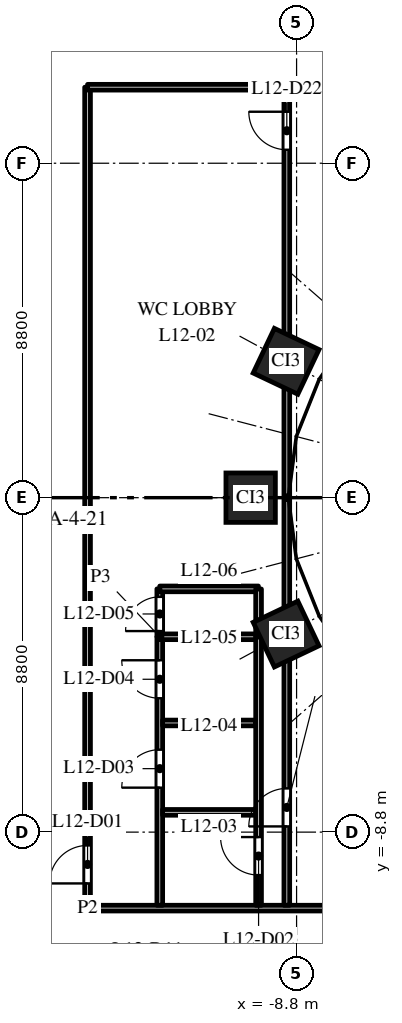
"""IFC4 building model, lengths in metres.
Left out: names, types, materials, properties, quantities, classifications, styles, units other than length and angle.
Written with IfcOpenShell. Run it as: python <this file> out.ifc"""

import sys

from ifc_helpers import new_model, si_unit, direction, frame, frame_2d, origin, origin_2d, place, context, subcontext, project, spatial, rectangle, extrude, element, fill, save


model = new_model("IFC4")
c1 = context("Model", 3, precision=1e-05, world=origin(), true_north=direction((0.0, 1.0)))
c2 = subcontext(c1, "Body", "Model", "MODEL_VIEW")
j1 = project(units=[si_unit("LENGTHUNIT", "METRE"), si_unit("PLANEANGLEUNIT", "RADIAN")], contexts=[c1])
p1 = place(None, origin())
s1 = spatial("IfcSite", under=j1, at=p1, CompositionType="ELEMENT")
p2 = place(p1, origin())
s2 = spatial("IfcBuilding", under=s1, at=p2, CompositionType="ELEMENT")
p3 = place(p2, frame((0.0, 0.0, 58.5)))
s3 = spatial("IfcBuildingStorey", under=s2, at=p3, CompositionType="ELEMENT", Elevation=58.5)
for number, where, z_axis, x_axis in (
    (1, (-9.076, 3.588, 0.0), (0.0, 0.0, 1.0), (-0.429, -0.903, 0.0)),
    (2, (-10.008, 0.0, 0.0), (0.0, 0.0, 1.0), (0.0, -1.0, 0.0)),
    (3, (-9.076, -3.588, 0.0), (0.0, 0.0, 1.0), (0.429, -0.903, 0.0)),
):
    element("IfcColumn", number, at=place(p3, frame(where, z_axis=z_axis, x_axis=x_axis)), inside=s3, PredefinedType="COLUMN", context=c2, shape_type="SweptSolid", body=[
        extrude(rectangle(XDim=1.3, YDim=1.3, at=origin_2d()), origin(), (0.0, 0.0, 1.0), 4.0),
    ])
p4 = place(p3, frame((-14.3, -10.8, 0.0), z_axis=(0.0, 0.0, 1.0), x_axis=(0.0, 1.0, 0.0)))
e4 = element("IfcWall", 4, at=p4, inside=s3, PredefinedType="PARTITIONING", context=c2, shape_type="SweptSolid", body=[
    extrude(rectangle(XDim=21.6, YDim=0.15, at=frame_2d((10.8, 0.0))), origin(), (0.0, 0.0, 1.0), 2.75),
])
p5 = place(p4, frame((0.65, 0.0, 0.0)))
e5 = element("IfcOpeningElement", 5, at=p5, cuts=e4, PredefinedType="OPENING", context=c2, shape_type="SweptSolid", body=[
    extrude(rectangle(XDim=1.0, YDim=2.1, at=frame_2d((0.5, 1.05))), frame((0.0, 0.085, 0.0), z_axis=(0.0, -1.0, 0.0), x_axis=(1.0, 0.0, 0.0)), (0.0, 0.0, 1.0), 0.17),
])
p6 = place(p3, frame((-14.3, -10.8, 0.0), z_axis=(0.0, 0.0, 1.0), x_axis=(1.0, 0.0, 0.0)))
e6 = element("IfcWall", 6, at=p6, inside=s3, PredefinedType="PARTITIONING", context=c2, shape_type="SweptSolid", body=[
    extrude(rectangle(XDim=28.6, YDim=0.15, at=frame_2d((14.3, 0.0))), origin(), (0.0, 0.0, 1.0), 2.85),
])
p7 = place(p6, frame((13.127, 0.0, 0.0)))
e7 = element("IfcOpeningElement", 7, at=p7, cuts=e6, PredefinedType="OPENING", context=c2, shape_type="SweptSolid", body=[
    extrude(rectangle(XDim=1.0, YDim=2.1, at=frame_2d((0.5, 1.05))), frame((0.0, 0.085, 0.0), z_axis=(0.0, -1.0, 0.0), x_axis=(1.0, 0.0, 0.0)), (0.0, 0.0, 1.0), 0.17),
])
p8 = place(p6, frame((17.893, 0.0, 0.0)))
e8 = element("IfcOpeningElement", 8, at=p8, cuts=e6, PredefinedType="OPENING", context=c2, shape_type="SweptSolid", body=[
    extrude(rectangle(XDim=1.0, YDim=2.1, at=frame_2d((0.5, 1.05))), frame((0.0, 0.085, 0.0), z_axis=(0.0, -1.0, 0.0), x_axis=(1.0, 0.0, 0.0)), (0.0, 0.0, 1.0), 0.17),
])
p9 = place(p3, frame((-14.3, 10.8, 0.0), z_axis=(0.0, 0.0, 1.0), x_axis=(1.0, 0.0, 0.0)))
e9 = element("IfcWall", 9, at=p9, inside=s3, PredefinedType="PARTITIONING", context=c2, shape_type="SweptSolid", body=[
    extrude(rectangle(XDim=28.6, YDim=0.15, at=frame_2d((14.3, 0.0))), origin(), (0.0, 0.0, 1.0), 2.85),
])
p10 = place(p9, frame((13.16, 0.0, 0.0)))
e10 = element("IfcOpeningElement", 10, at=p10, cuts=e9, PredefinedType="OPENING", context=c2, shape_type="SweptSolid", body=[
    extrude(rectangle(XDim=1.0, YDim=2.1, at=frame_2d((0.5, 1.05))), frame((0.0, 0.085, 0.0), z_axis=(0.0, -1.0, 0.0), x_axis=(1.0, 0.0, 0.0)), (0.0, 0.0, 1.0), 0.17),
])
p11 = place(p9, frame((17.927, 0.0, 0.0)))
e11 = element("IfcOpeningElement", 11, at=p11, cuts=e9, PredefinedType="OPENING", context=c2, shape_type="SweptSolid", body=[
    extrude(rectangle(XDim=1.0, YDim=2.1, at=frame_2d((0.5, 1.05))), frame((0.0, 0.085, 0.0), z_axis=(0.0, -1.0, 0.0), x_axis=(1.0, 0.0, 0.0)), (0.0, 0.0, 1.0), 0.17),
])
p12 = place(p9, frame((20.193, 0.0, 0.0)))
e12 = element("IfcOpeningElement", 12, at=p12, cuts=e9, PredefinedType="OPENING", context=c2, shape_type="SweptSolid", body=[
    extrude(rectangle(XDim=1.0, YDim=2.1, at=frame_2d((0.5, 1.05))), frame((0.0, 0.085, 0.0), z_axis=(0.0, -1.0, 0.0), x_axis=(1.0, 0.0, 0.0)), (0.0, 0.0, 1.0), 0.17),
])
p13 = place(p3, frame((-12.4, -10.725, 0.0), z_axis=(0.0, 0.0, 1.0), x_axis=(0.0, 1.0, 0.0)))
e13 = element("IfcWall", 13, at=p13, inside=s3, PredefinedType="PARTITIONING", context=c2, shape_type="SweptSolid", body=[
    extrude(rectangle(XDim=7.065, YDim=0.15, at=frame_2d((3.533, 0.0))), origin(), (0.0, 0.0, 1.0), 2.75),
])
p14 = place(p13, frame((3.095, 0.0, 0.0)))
e14 = element("IfcOpeningElement", 14, at=p14, cuts=e13, PredefinedType="OPENING", context=c2, shape_type="SweptSolid", body=[
    extrude(rectangle(XDim=1.0, YDim=2.1, at=frame_2d((0.5, 1.05))), frame((0.0, 0.085, 0.0), z_axis=(0.0, -1.0, 0.0), x_axis=(1.0, 0.0, 0.0)), (0.0, 0.0, 1.0), 0.17),
])
p15 = place(p13, frame((5.447, 0.0, 0.0)))
e15 = element("IfcOpeningElement", 15, at=p15, cuts=e13, PredefinedType="OPENING", context=c2, shape_type="SweptSolid", body=[
    extrude(rectangle(XDim=1.0, YDim=2.1, at=frame_2d((0.5, 1.05))), frame((0.0, 0.085, 0.0), z_axis=(0.0, -1.0, 0.0), x_axis=(1.0, 0.0, 0.0)), (0.0, 0.0, 1.0), 0.17),
])
p16 = place(p3, frame((-12.325, -8.28, 0.0), z_axis=(0.0, 0.0, 1.0), x_axis=(1.0, 0.0, 0.0)))
e16 = element("IfcWall", 16, at=p16, inside=s3, PredefinedType="PARTITIONING", context=c2, shape_type="SweptSolid", body=[
    extrude(rectangle(XDim=2.45, YDim=0.15, at=frame_2d((1.225, 0.0))), origin(), (0.0, 0.0, 1.0), 2.75),
])
p17 = place(p3, frame((-12.325, -5.928, 0.0), z_axis=(0.0, 0.0, 1.0), x_axis=(1.0, 0.0, 0.0)))
e17 = element("IfcWall", 17, at=p17, inside=s3, PredefinedType="PARTITIONING", context=c2, shape_type="SweptSolid", body=[
    extrude(rectangle(XDim=2.45, YDim=0.15, at=frame_2d((1.225, 0.0))), origin(), (0.0, 0.0, 1.0), 3.7),
])
p18 = place(p3, frame((-12.4, -3.66, 0.0), z_axis=(0.0, 0.0, 1.0), x_axis=(0.0, 1.0, 0.0)))
e18 = element("IfcWall", 18, at=p18, inside=s3, PredefinedType="PARTITIONING", context=c2, shape_type="SweptSolid", body=[
    extrude(rectangle(XDim=1.26, YDim=0.15, at=frame_2d((0.63, 0.0))), origin(), (0.0, 0.0, 1.0), 3.7),
])
p19 = place(p18, frame((0.15, 0.0, 0.0)))
e19 = element("IfcOpeningElement", 19, at=p19, cuts=e18, PredefinedType="OPENING", context=c2, shape_type="SweptSolid", body=[
    extrude(rectangle(XDim=0.9, YDim=2.1, at=frame_2d((0.45, 1.05))), frame((0.0, 0.085, 0.0), z_axis=(0.0, -1.0, 0.0), x_axis=(1.0, 0.0, 0.0)), (0.0, 0.0, 1.0), 0.17),
])
p20 = place(p3, frame((-12.4, -3.66, 0.0), z_axis=(0.0, 0.0, 1.0), x_axis=(1.0, 0.0, 0.0)))
e20 = element("IfcWall", 20, at=p20, inside=s3, PredefinedType="PARTITIONING", context=c2, shape_type="SweptSolid", body=[
    extrude(rectangle(XDim=2.6, YDim=0.15, at=frame_2d((1.3, 0.0))), origin(), (0.0, 0.0, 1.0), 3.7),
])
p21 = place(p3, frame((-12.4, -2.4, 0.0), z_axis=(0.0, 0.0, 1.0), x_axis=(1.0, 0.0, 0.0)))
e21 = element("IfcWall", 21, at=p21, inside=s3, PredefinedType="PARTITIONING", context=c2, shape_type="SweptSolid", body=[
    extrude(rectangle(XDim=2.596, YDim=0.15, at=frame_2d((1.298, 0.0))), origin(), (0.0, 0.0, 1.0), 3.7),
])
p22 = place(p3, frame((-9.8, -10.725, 0.0), z_axis=(0.0, 0.0, 1.0), x_axis=(0.0, 1.0, 0.0)))
e22 = element("IfcWall", 22, at=p22, inside=s3, PredefinedType="PARTITIONING", context=c2, shape_type="SweptSolid", body=[
    extrude(rectangle(XDim=7.065, YDim=0.15, at=frame_2d((3.533, 0.0))), origin(), (0.0, 0.0, 1.0), 2.75),
])
p23 = place(p22, frame((0.795, 0.0, 0.0)))
e23 = element("IfcOpeningElement", 23, at=p23, cuts=e22, PredefinedType="OPENING", context=c2, shape_type="SweptSolid", body=[
    extrude(rectangle(XDim=1.0, YDim=2.1, at=frame_2d((0.5, 1.05))), frame((0.0, 0.085, 0.0), z_axis=(0.0, -1.0, 0.0), x_axis=(1.0, 0.0, 0.0)), (0.0, 0.0, 1.0), 0.17),
])
p24 = place(p3, frame((-9.8, -3.66, 0.0), z_axis=(0.0, 0.0, 1.0), x_axis=(0.0, 1.0, 0.0)))
e24 = element("IfcWall", 24, at=p24, inside=s3, PredefinedType="PARTITIONING", context=c2, shape_type="SweptSolid", body=[
    extrude(rectangle(XDim=1.256, YDim=0.15, at=frame_2d((0.628, 0.0))), origin(), (0.0, 0.0, 1.0), 3.7),
])
p25 = place(p3, frame((-9.057, -10.725, 0.0), z_axis=(0.0, 0.0, 1.0), x_axis=(0.0, 1.0, 0.0)))
e25 = element("IfcWall", 25, at=p25, inside=s3, PredefinedType="PARTITIONING", context=c2, shape_type="SweptSolid", body=[
    extrude(rectangle(XDim=10.68, YDim=0.15, at=frame_2d((5.34, 0.0))), origin(), (0.0, 0.0, 1.0), 2.75),
])
p26 = place(p25, frame((2.075, 0.0, 0.0)))
e26 = element("IfcOpeningElement", 26, at=p26, cuts=e25, PredefinedType="OPENING", context=c2, shape_type="SweptSolid", body=[
    extrude(rectangle(XDim=1.0, YDim=2.1, at=frame_2d((0.5, 1.05))), frame((0.0, 0.085, 0.0), z_axis=(0.0, -1.0, 0.0), x_axis=(1.0, 0.0, 0.0)), (0.0, 0.0, 1.0), 0.17),
])
p27 = place(p3, frame((-9.057, 0.045, 0.0), z_axis=(0.0, 0.0, 1.0), x_axis=(0.0, 1.0, 0.0)))
e27 = element("IfcWall", 27, at=p27, inside=s3, PredefinedType="PARTITIONING", context=c2, shape_type="SweptSolid", body=[
    extrude(rectangle(XDim=10.68, YDim=0.15, at=frame_2d((5.34, 0.0))), origin(), (0.0, 0.0, 1.0), 2.75),
])
p28 = place(p27, frame((9.11, 0.0, 0.0)))
e28 = element("IfcOpeningElement", 28, at=p28, cuts=e27, PredefinedType="OPENING", context=c2, shape_type="SweptSolid", body=[
    extrude(rectangle(XDim=1.0, YDim=2.1, at=frame_2d((0.5, 1.05))), frame((0.0, 0.085, 0.0), z_axis=(0.0, -1.0, 0.0), x_axis=(1.0, 0.0, 0.0)), (0.0, 0.0, 1.0), 0.17),
])
p29 = place(p5, origin())
e29 = element("IfcDoor", 29, at=p29, inside=s3, OperationType="SINGLE_SWING_LEFT", PredefinedType="DOOR", context=c2, shape_type="SweptSolid", body=[
    extrude(rectangle(XDim=1.0, YDim=2.1, at=frame_2d((0.5, 1.05))), frame((0.0, 0.025, 0.0), z_axis=(0.0, -1.0, 0.0), x_axis=(1.0, 0.0, 0.0)), (0.0, 0.0, 1.0), 0.05),
])
fill(e5, e29)
p30 = place(p23, origin())
e30 = element("IfcDoor", 30, at=p30, inside=s3, OperationType="SINGLE_SWING_RIGHT", PredefinedType="DOOR", context=c2, shape_type="SweptSolid", body=[
    extrude(rectangle(XDim=1.0, YDim=2.1, at=frame_2d((0.5, 1.05))), frame((0.0, 0.025, 0.0), z_axis=(0.0, -1.0, 0.0), x_axis=(1.0, 0.0, 0.0)), (0.0, 0.0, 1.0), 0.05),
])
fill(e23, e30)
p31 = place(p14, origin())
e31 = element("IfcDoor", 31, at=p31, inside=s3, OperationType="SINGLE_SWING_LEFT", PredefinedType="DOOR", context=c2, shape_type="SweptSolid", body=[
    extrude(rectangle(XDim=1.0, YDim=2.1, at=frame_2d((0.5, 1.05))), frame((0.0, 0.025, 0.0), z_axis=(0.0, -1.0, 0.0), x_axis=(1.0, 0.0, 0.0)), (0.0, 0.0, 1.0), 0.05),
])
fill(e14, e31)
p32 = place(p15, origin())
e32 = element("IfcDoor", 32, at=p32, inside=s3, OperationType="SINGLE_SWING_RIGHT", PredefinedType="DOOR", context=c2, shape_type="SweptSolid", body=[
    extrude(rectangle(XDim=1.0, YDim=2.1, at=frame_2d((0.5, 1.05))), frame((0.0, 0.025, 0.0), z_axis=(0.0, -1.0, 0.0), x_axis=(1.0, 0.0, 0.0)), (0.0, 0.0, 1.0), 0.05),
])
fill(e15, e32)
p33 = place(p19, origin())
e33 = element("IfcDoor", 33, at=p33, inside=s3, OperationType="SINGLE_SWING_LEFT", PredefinedType="DOOR", context=c2, shape_type="SweptSolid", body=[
    extrude(rectangle(XDim=0.9, YDim=2.1, at=frame_2d((0.45, 1.05))), frame((0.0, 0.025, 0.0), z_axis=(0.0, -1.0, 0.0), x_axis=(1.0, 0.0, 0.0)), (0.0, 0.0, 1.0), 0.05),
])
fill(e19, e33)
p34 = place(p26, origin())
e34 = element("IfcDoor", 34, at=p34, inside=s3, OperationType="SINGLE_SWING_LEFT", PredefinedType="DOOR", context=c2, shape_type="SweptSolid", body=[
    extrude(rectangle(XDim=1.0, YDim=2.1, at=frame_2d((0.5, 1.05))), frame((0.0, 0.025, 0.0), z_axis=(0.0, -1.0, 0.0), x_axis=(1.0, 0.0, 0.0)), (0.0, 0.0, 1.0), 0.05),
])
fill(e26, e34)
p35 = place(p28, origin())
e35 = element("IfcDoor", 35, at=p35, inside=s3, OperationType="SINGLE_SWING_RIGHT", PredefinedType="DOOR", context=c2, shape_type="SweptSolid", body=[
    extrude(rectangle(XDim=1.0, YDim=2.1, at=frame_2d((0.5, 1.05))), frame((0.0, 0.025, 0.0), z_axis=(0.0, -1.0, 0.0), x_axis=(1.0, 0.0, 0.0)), (0.0, 0.0, 1.0), 0.05),
])
fill(e28, e35)
save(model, sys.argv[1])
